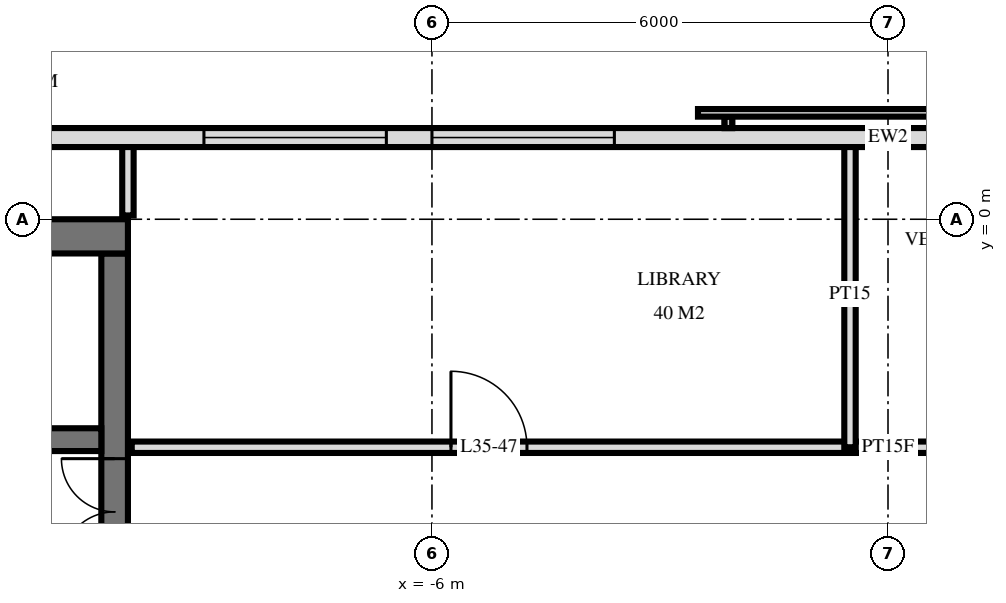
"""IFC4 building model, lengths in metres.
Left out: names, types, materials, properties, quantities, classifications, styles, units other than length and angle.
Written with IfcOpenShell. Run it as: python <this file> out.ifc"""

import sys

from ifc_helpers import new_model, si_unit, direction, frame, frame_2d, origin, place, context, subcontext, project, spatial, rectangle, extrude, element, fill, save


model = new_model("IFC4")
c1 = context("Model", 3, precision=1e-05, world=origin(), true_north=direction((0.0, 1.0)))
c2 = subcontext(c1, "Body", "Model", "MODEL_VIEW")
j1 = project(units=[si_unit("LENGTHUNIT", "METRE"), si_unit("PLANEANGLEUNIT", "RADIAN")], contexts=[c1])
p1 = place(None, origin())
s1 = spatial("IfcSite", under=j1, at=p1, CompositionType="ELEMENT")
p2 = place(p1, origin())
s2 = spatial("IfcBuilding", under=s1, at=p2, CompositionType="ELEMENT")
p3 = place(p2, frame((0.0, 0.0, 138.0)))
s3 = spatial("IfcBuildingStorey", under=s2, at=p3, CompositionType="ELEMENT", Elevation=138.0)
p4 = place(p3, frame((-24.5, -0.225, 0.0), z_axis=(0.0, 0.0, 1.0), x_axis=(1.0, 0.0, 0.0)))
e1 = element("IfcWall", 1, at=p4, inside=s3, PredefinedType="SHEAR", context=c2, shape_type="SweptSolid", body=[
    extrude(rectangle(XDim=14.5, YDim=0.45, at=frame_2d((7.25, 0.0))), origin(), (0.0, 0.0, 1.0), 3.6),
])
p5 = place(p3, frame((-10.175, -14.55, 0.0), z_axis=(0.0, 0.0, 1.0), x_axis=(0.0, 1.0, 0.0)))
e2 = element("IfcWall", 2, at=p5, inside=s3, PredefinedType="SHEAR", context=c2, shape_type="SweptSolid", body=[
    extrude(rectangle(XDim=14.1, YDim=0.35, at=frame_2d((7.05, 0.0))), origin(), (0.0, 0.0, 1.0), 3.6),
])
p6 = place(p5, frame((8.4, 0.0, 0.0)))
e3 = element("IfcOpeningElement", 3, at=p6, cuts=e2, PredefinedType="OPENING", context=c2, shape_type="SweptSolid", body=[
    extrude(rectangle(XDim=1.4, YDim=2.4, at=frame_2d((0.7, 1.2))), frame((0.0, 0.185, 0.0), z_axis=(0.0, -1.0, 0.0), x_axis=(1.0, 0.0, 0.0)), (0.0, 0.0, 1.0), 0.37),
])
p7 = place(p5, frame((10.0, 0.0, 0.0)))
e4 = element("IfcOpeningElement", 4, at=p7, cuts=e2, PredefinedType="OPENING", context=c2, shape_type="SweptSolid", body=[
    extrude(rectangle(XDim=1.4, YDim=2.4, at=frame_2d((0.7, 1.2))), frame((0.0, 0.185, 0.0), z_axis=(0.0, -1.0, 0.0), x_axis=(1.0, 0.0, 0.0)), (0.0, 0.0, 1.0), 0.37),
])
p8 = place(p5, frame((4.0, 0.0, 0.0)))
e5 = element("IfcOpeningElement", 5, at=p8, cuts=e2, PredefinedType="OPENING", context=c2, shape_type="SweptSolid", body=[
    extrude(rectangle(XDim=1.2, YDim=2.1, at=frame_2d((0.6, 1.05))), frame((0.0, 0.185, 0.0), z_axis=(0.0, -1.0, 0.0), x_axis=(1.0, 0.0, 0.0)), (0.0, 0.0, 1.0), 0.37),
])
p9 = place(p3, frame((-24.05, -2.9, 0.0), z_axis=(0.0, 0.0, 1.0), x_axis=(1.0, 0.0, 0.0)))
e6 = element("IfcWall", 6, at=p9, inside=s3, PredefinedType="SHEAR", context=c2, shape_type="SweptSolid", body=[
    extrude(rectangle(XDim=13.7, YDim=0.3, at=frame_2d((6.85, 0.0))), origin(), (0.0, 0.0, 1.0), 3.6),
])
p10 = place(p9, frame((0.55, 0.0, 0.0)))
e7 = element("IfcOpeningElement", 7, at=p10, cuts=e6, PredefinedType="OPENING", context=c2, shape_type="SweptSolid", body=[
    extrude(rectangle(XDim=1.1, YDim=2.1, at=frame_2d((0.55, 1.05))), frame((0.0, 0.16, 0.0), z_axis=(0.0, -1.0, 0.0), x_axis=(1.0, 0.0, 0.0)), (0.0, 0.0, 1.0), 0.32),
])
p11 = place(p9, frame((5.9, 0.0, 0.0)))
e8 = element("IfcOpeningElement", 8, at=p11, cuts=e6, PredefinedType="OPENING", context=c2, shape_type="SweptSolid", body=[
    extrude(rectangle(XDim=0.9, YDim=2.1, at=frame_2d((0.45, 1.05))), frame((0.0, 0.16, 0.0), z_axis=(0.0, -1.0, 0.0), x_axis=(1.0, 0.0, 0.0)), (0.0, 0.0, 1.0), 0.32),
])
p12 = place(p9, frame((11.85, 0.0, 0.0)))
e9 = element("IfcOpeningElement", 9, at=p12, cuts=e6, PredefinedType="OPENING", context=c2, shape_type="SweptSolid", body=[
    extrude(rectangle(XDim=1.0, YDim=2.1, at=frame_2d((0.5, 1.05))), frame((0.0, 0.16, 0.0), z_axis=(0.0, -1.0, 0.0), x_axis=(1.0, 0.0, 0.0)), (0.0, 0.0, 1.0), 0.32),
])
p13 = place(p9, frame((9.312, 0.0, 0.0)))
e10 = element("IfcOpeningElement", 10, at=p13, cuts=e6, PredefinedType="OPENING", context=c2, shape_type="SweptSolid", body=[
    extrude(rectangle(XDim=1.0, YDim=2.1, at=frame_2d((0.5, 1.05))), frame((0.0, 0.16, 0.0), z_axis=(0.0, -1.0, 0.0), x_axis=(1.0, 0.0, 0.0)), (0.0, 0.0, 1.0), 0.32),
])
p14 = place(p9, frame((7.887, 0.0, 0.0)))
e11 = element("IfcOpeningElement", 11, at=p14, cuts=e6, PredefinedType="OPENING", context=c2, shape_type="SweptSolid", body=[
    extrude(rectangle(XDim=1.0, YDim=2.1, at=frame_2d((0.5, 1.05))), frame((0.0, 0.16, 0.0), z_axis=(0.0, -1.0, 0.0), x_axis=(1.0, 0.0, 0.0)), (0.0, 0.0, 1.0), 0.32),
])
p15 = place(p9, frame((3.0, 0.0, 0.0)))
e12 = element("IfcOpeningElement", 12, at=p15, cuts=e6, PredefinedType="OPENING", context=c2, shape_type="SweptSolid", body=[
    extrude(rectangle(XDim=1.0, YDim=2.1, at=frame_2d((0.5, 1.05))), frame((0.0, 0.16, 0.0), z_axis=(0.0, -1.0, 0.0), x_axis=(1.0, 0.0, 0.0)), (0.0, 0.0, 1.0), 0.32),
])
p16 = place(p3, frame((23.675, 1.075, 0.0), z_axis=(0.0, 0.0, 1.0), x_axis=(-1.0, 0.0, 0.0)))
e13 = element("IfcWall", 13, at=p16, inside=s3, PredefinedType="SOLIDWALL", context=c2, shape_type="SweptSolid", body=[
    extrude(rectangle(XDim=47.351, YDim=0.25, at=frame_2d((23.675, 0.0))), origin(), (0.0, 0.0, 1.0), 3.32),
])
p17 = place(p16, frame((27.275, 0.0, 0.3)))
e14 = element("IfcOpeningElement", 14, at=p17, cuts=e13, PredefinedType="OPENING", context=c2, shape_type="SweptSolid", body=[
    extrude(rectangle(XDim=2.4, YDim=2.1, at=frame_2d((1.2, 1.05))), frame((0.0, 0.135, 0.0), z_axis=(0.0, -1.0, 0.0), x_axis=(1.0, 0.0, 0.0)), (0.0, 0.0, 1.0), 0.27),
])
p18 = place(p16, frame((30.275, 0.0, 0.3)))
e15 = element("IfcOpeningElement", 15, at=p18, cuts=e13, PredefinedType="OPENING", context=c2, shape_type="SweptSolid", body=[
    extrude(rectangle(XDim=2.4, YDim=2.1, at=frame_2d((1.2, 1.05))), frame((0.0, 0.135, 0.0), z_axis=(0.0, -1.0, 0.0), x_axis=(1.0, 0.0, 0.0)), (0.0, 0.0, 1.0), 0.27),
])
p19 = place(p3, frame((-0.5, -3.0, 0.0), z_axis=(0.0, 0.0, 1.0), x_axis=(0.0, 1.0, 0.0)))
e16 = element("IfcWall", 16, at=p19, inside=s3, PredefinedType="PARTITIONING", context=c2, shape_type="SweptSolid", body=[
    extrude(rectangle(XDim=4.02, YDim=0.15, at=frame_2d((2.01, 0.0))), origin(), (0.0, 0.0, 1.0), 3.32),
])
p20 = place(p3, frame((-10.0, 0.05, 0.0), z_axis=(0.0, 0.0, 1.0), x_axis=(0.0, 1.0, 0.0)))
e17 = element("IfcWall", 17, at=p20, inside=s3, PredefinedType="PARTITIONING", context=c2, shape_type="SweptSolid", body=[
    extrude(rectangle(XDim=0.97, YDim=0.15, at=frame_2d((0.485, 0.0))), origin(), (0.0, 0.0, 1.0), 3.32),
])
p21 = place(p3, frame((-9.95, -3.0, 0.0), z_axis=(0.0, 0.0, 1.0), x_axis=(1.0, 0.0, 0.0)))
e18 = element("IfcWall", 18, at=p21, inside=s3, PredefinedType="PARTITIONING", context=c2, shape_type="SweptSolid", body=[
    extrude(rectangle(XDim=19.9, YDim=0.15, at=frame_2d((9.95, 0.0))), origin(), (0.0, 0.0, 1.0), 3.32),
])
p22 = place(p21, frame((4.2, 0.0, 0.0)))
e19 = element("IfcOpeningElement", 19, at=p22, cuts=e18, PredefinedType="OPENING", context=c2, shape_type="SweptSolid", body=[
    extrude(rectangle(XDim=1.0, YDim=2.1, at=frame_2d((0.5, 1.05))), frame((0.0, 0.085, 0.0), z_axis=(0.0, -1.0, 0.0), x_axis=(1.0, 0.0, 0.0)), (0.0, 0.0, 1.0), 0.17),
])
p23 = place(p21, frame((11.45, 0.0, 0.0)))
e20 = element("IfcOpeningElement", 20, at=p23, cuts=e18, PredefinedType="OPENING", context=c2, shape_type="SweptSolid", body=[
    extrude(rectangle(XDim=1.0, YDim=2.1, at=frame_2d((0.5, 1.05))), frame((0.0, 0.085, 0.0), z_axis=(0.0, -1.0, 0.0), x_axis=(1.0, 0.0, 0.0)), (0.0, 0.0, 1.0), 0.17),
])
p24 = place(p21, frame((15.45, 0.0, 0.0)))
e21 = element("IfcOpeningElement", 21, at=p24, cuts=e18, PredefinedType="OPENING", context=c2, shape_type="SweptSolid", body=[
    extrude(rectangle(XDim=1.0, YDim=2.1, at=frame_2d((0.5, 1.05))), frame((0.0, 0.085, 0.0), z_axis=(0.0, -1.0, 0.0), x_axis=(1.0, 0.0, 0.0)), (0.0, 0.0, 1.0), 0.17),
])
p25 = place(p21, frame((18.2, 0.0, 0.0)))
e22 = element("IfcOpeningElement", 22, at=p25, cuts=e18, PredefinedType="OPENING", context=c2, shape_type="SweptSolid", body=[
    extrude(rectangle(XDim=1.0, YDim=2.1, at=frame_2d((0.5, 1.05))), frame((0.0, 0.085, 0.0), z_axis=(0.0, -1.0, 0.0), x_axis=(1.0, 0.0, 0.0)), (0.0, 0.0, 1.0), 0.17),
])
p26 = place(p17, origin())
e23 = element("IfcWindow", 23, at=p26, inside=s3, PartitioningType="SINGLE_PANEL", PredefinedType="WINDOW", context=c2, shape_type="SweptSolid", body=[
    extrude(rectangle(XDim=2.4, YDim=2.1, at=frame_2d((1.2, 1.05))), frame((0.0, 0.03, 0.0), z_axis=(0.0, -1.0, 0.0), x_axis=(1.0, 0.0, 0.0)), (0.0, 0.0, 1.0), 0.06),
])
fill(e14, e23)
p27 = place(p18, origin())
e24 = element("IfcWindow", 24, at=p27, inside=s3, PartitioningType="SINGLE_PANEL", PredefinedType="WINDOW", context=c2, shape_type="SweptSolid", body=[
    extrude(rectangle(XDim=2.4, YDim=2.1, at=frame_2d((1.2, 1.05))), frame((0.0, 0.03, 0.0), z_axis=(0.0, -1.0, 0.0), x_axis=(1.0, 0.0, 0.0)), (0.0, 0.0, 1.0), 0.06),
])
fill(e15, e24)
p28 = place(p7, origin())
e25 = element("IfcDoor", 25, at=p28, inside=s3, OperationType="DOUBLE_DOOR_SINGLE_SWING", PredefinedType="DOOR", context=c2, shape_type="SweptSolid", body=[
    extrude(rectangle(XDim=1.4, YDim=2.4, at=frame_2d((0.7, 1.2))), frame((0.0, 0.025, 0.0), z_axis=(0.0, -1.0, 0.0), x_axis=(1.0, 0.0, 0.0)), (0.0, 0.0, 1.0), 0.05),
])
fill(e4, e25)
p29 = place(p22, origin())
e26 = element("IfcDoor", 26, at=p29, inside=s3, OperationType="SINGLE_SWING_RIGHT", PredefinedType="DOOR", context=c2, shape_type="SweptSolid", body=[
    extrude(rectangle(XDim=1.0, YDim=2.1, at=frame_2d((0.5, 1.05))), frame((0.0, 0.025, 0.0), z_axis=(0.0, -1.0, 0.0), x_axis=(1.0, 0.0, 0.0)), (0.0, 0.0, 1.0), 0.05),
])
fill(e19, e26)
save(model, sys.argv[1])
